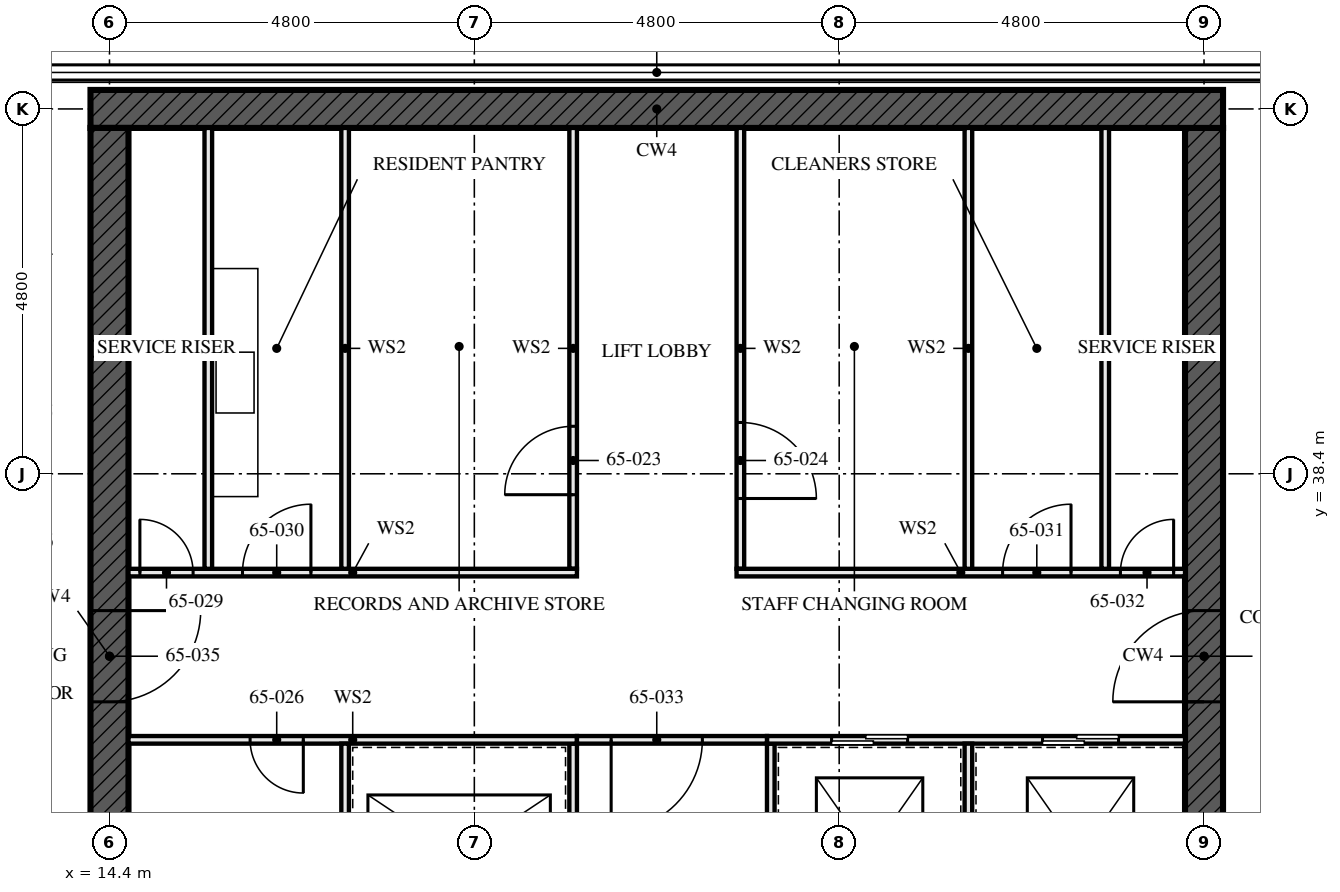
"""IFC4 building model, lengths in metres.
Left out: names, types, materials, properties, quantities, classifications, styles, units other than length and angle.
Written with IfcOpenShell. Run it as: python <this file> out.ifc"""

import sys

from ifc_helpers import new_model, si_unit, direction, frame, frame_2d, origin, place, context, subcontext, project, spatial, rectangle, extrude, element, fill, save


model = new_model("IFC4")
c1 = context("Model", 3, precision=1e-05, world=origin(), true_north=direction((0.0, 1.0)))
c2 = subcontext(c1, "Body", "Model", "MODEL_VIEW")
j1 = project(units=[si_unit("LENGTHUNIT", "METRE"), si_unit("PLANEANGLEUNIT", "RADIAN")], contexts=[c1])
p1 = place(None, origin())
s1 = spatial("IfcSite", under=j1, at=p1, CompositionType="ELEMENT")
p2 = place(p1, origin())
s2 = spatial("IfcBuilding", under=s1, at=p2, CompositionType="ELEMENT")
p3 = place(p2, frame((0.0, 0.0, 236.5)))
s3 = spatial("IfcBuildingStorey", under=s2, at=p3, CompositionType="ELEMENT", Elevation=236.5)
p4 = place(p3, frame((29.05, 43.2, -0.17), z_axis=(0.0, 0.0, 1.0), x_axis=(-1.0, 0.0, 0.0)))
e1 = element("IfcWall", 1, at=p4, inside=s3, PredefinedType="SHEAR", context=c2, shape_type="SweptSolid", body=[
    extrude(rectangle(XDim=14.9, YDim=0.5, at=frame_2d((7.45, 0.0))), origin(), (0.0, 0.0, 1.0), 3.5),
])
p5 = place(p3, frame((14.4, 42.95, -0.17), z_axis=(0.0, 0.0, 1.0), x_axis=(0.0, -1.0, 0.0)))
e2 = element("IfcWall", 2, at=p5, inside=s3, PredefinedType="SHEAR", context=c2, shape_type="SweptSolid", body=[
    extrude(rectangle(XDim=13.9, YDim=0.5, at=frame_2d((6.95, 0.0))), origin(), (0.0, 0.0, 1.0), 3.5),
])
p6 = place(p5, frame((6.35, 0.0, 0.17)))
e3 = element("IfcOpeningElement", 3, at=p6, cuts=e2, PredefinedType="OPENING", context=c2, shape_type="SweptSolid", body=[
    extrude(rectangle(XDim=1.2, YDim=2.1, at=frame_2d((0.6, 1.05))), frame((0.0, 0.26, 0.0), z_axis=(0.0, -1.0, 0.0), x_axis=(1.0, 0.0, 0.0)), (0.0, 0.0, 1.0), 0.521),
])
p7 = place(p3, frame((28.8, 29.05, -0.17), z_axis=(0.0, 0.0, 1.0), x_axis=(0.0, 1.0, 0.0)))
e4 = element("IfcWall", 4, at=p7, inside=s3, PredefinedType="SHEAR", context=c2, shape_type="SweptSolid", body=[
    extrude(rectangle(XDim=13.9, YDim=0.5, at=frame_2d((6.95, 0.0))), origin(), (0.0, 0.0, 1.0), 3.5),
])
p8 = place(p7, frame((6.35, 0.0, 0.17)))
e5 = element("IfcOpeningElement", 5, at=p8, cuts=e4, PredefinedType="OPENING", context=c2, shape_type="SweptSolid", body=[
    extrude(rectangle(XDim=1.2, YDim=2.1, at=frame_2d((0.6, 1.05))), frame((0.0, 0.26, 0.0), z_axis=(0.0, -1.0, 0.0), x_axis=(1.0, 0.0, 0.0)), (0.0, 0.0, 1.0), 0.521),
])
for number, where, z_axis, x_axis in (
    (6, (15.7, 37.15, 0.0), (0.0, 0.0, 1.0), (0.0, 1.0, 0.0)),
    (7, (27.5, 37.15, 0.0), (0.0, 0.0, 1.0), (0.0, 1.0, 0.0)),
):
    element("IfcWall", number, at=place(p3, frame(where, z_axis=z_axis, x_axis=x_axis)), inside=s3, PredefinedType="SOLIDWALL", context=c2, shape_type="SweptSolid", body=[
        extrude(rectangle(XDim=5.8, YDim=0.1, at=frame_2d((2.9, 0.0))), origin(), (0.0, 0.0, 1.0), 3.33),
    ])
p9 = place(p3, frame((20.5, 29.05, 0.0), z_axis=(0.0, 0.0, 1.0), x_axis=(0.0, 1.0, 0.0)))
e8 = element("IfcWall", 8, at=p9, inside=s3, PredefinedType="SOLIDWALL", context=c2, shape_type="SweptSolid", body=[
    extrude(rectangle(XDim=5.8, YDim=0.1, at=frame_2d((2.9, 0.0))), origin(), (0.0, 0.0, 1.0), 3.33),
])
p10 = place(p9, frame((0.8, 0.0, 0.0)))
e9 = element("IfcOpeningElement", 9, at=p10, cuts=e8, PredefinedType="OPENING", context=c2, shape_type="SweptSolid", body=[
    extrude(rectangle(XDim=1.1, YDim=2.3, at=frame_2d((0.55, 1.15))), frame((0.0, 0.061, 0.0), z_axis=(0.0, -1.0, 0.0), x_axis=(1.0, 0.0, 0.0)), (0.0, 0.0, 1.0), 0.121),
])
p11 = place(p9, frame((3.775, 0.0, 0.0)))
e10 = element("IfcOpeningElement", 10, at=p11, cuts=e8, PredefinedType="OPENING", context=c2, shape_type="SweptSolid", body=[
    extrude(rectangle(XDim=1.1, YDim=2.3, at=frame_2d((0.55, 1.15))), frame((0.0, 0.061, 0.0), z_axis=(0.0, -1.0, 0.0), x_axis=(1.0, 0.0, 0.0)), (0.0, 0.0, 1.0), 0.121),
])
p12 = place(p3, frame((20.5, 37.15, 0.0), z_axis=(0.0, 0.0, 1.0), x_axis=(0.0, 1.0, 0.0)))
e11 = element("IfcWall", 11, at=p12, inside=s3, PredefinedType="SOLIDWALL", context=c2, shape_type="SweptSolid", body=[
    extrude(rectangle(XDim=5.8, YDim=0.1, at=frame_2d((2.9, 0.0))), origin(), (0.0, 0.0, 1.0), 3.33),
])
p13 = place(p12, frame((0.975, 0.0, 0.0)))
e12 = element("IfcOpeningElement", 12, at=p13, cuts=e11, PredefinedType="OPENING", context=c2, shape_type="SweptSolid", body=[
    extrude(rectangle(XDim=0.9, YDim=2.1, at=frame_2d((0.45, 1.05))), frame((0.0, 0.061, 0.0), z_axis=(0.0, -1.0, 0.0), x_axis=(1.0, 0.0, 0.0)), (0.0, 0.0, 1.0), 0.121),
])
p14 = place(p3, frame((22.7, 37.15, 0.0), z_axis=(0.0, 0.0, 1.0), x_axis=(0.0, 1.0, 0.0)))
e13 = element("IfcWall", 13, at=p14, inside=s3, PredefinedType="SOLIDWALL", context=c2, shape_type="SweptSolid", body=[
    extrude(rectangle(XDim=5.8, YDim=0.1, at=frame_2d((2.9, 0.0))), origin(), (0.0, 0.0, 1.0), 3.33),
])
p15 = place(p14, frame((0.925, 0.0, 0.0)))
e14 = element("IfcOpeningElement", 14, at=p15, cuts=e13, PredefinedType="OPENING", context=c2, shape_type="SweptSolid", body=[
    extrude(rectangle(XDim=1.0, YDim=2.1, at=frame_2d((0.5, 1.05))), frame((0.0, 0.061, 0.0), z_axis=(0.0, -1.0, 0.0), x_axis=(1.0, 0.0, 0.0)), (0.0, 0.0, 1.0), 0.121),
])
p16 = place(p3, frame((23.1, 29.05, 0.0), z_axis=(0.0, 0.0, 1.0), x_axis=(0.0, 1.0, 0.0)))
e15 = element("IfcWall", 15, at=p16, inside=s3, PredefinedType="SOLIDWALL", context=c2, shape_type="SweptSolid", body=[
    extrude(rectangle(XDim=5.8, YDim=0.1, at=frame_2d((2.9, 0.0))), origin(), (0.0, 0.0, 1.0), 3.33),
])
p17 = place(p16, frame((1.0, 0.0, 0.0)))
e16 = element("IfcOpeningElement", 16, at=p17, cuts=e15, PredefinedType="OPENING", context=c2, shape_type="SweptSolid", body=[
    extrude(rectangle(XDim=0.7, YDim=2.1, at=frame_2d((0.35, 1.05))), frame((0.0, 0.061, 0.0), z_axis=(0.0, -1.0, 0.0), x_axis=(1.0, 0.0, 0.0)), (0.0, 0.0, 1.0), 0.121),
])
p18 = place(p3, frame((14.65, 34.9, 0.0), z_axis=(0.0, 0.0, 1.0), x_axis=(1.0, 0.0, 0.0)))
e17 = element("IfcWall", 17, at=p18, inside=s3, PredefinedType="SOLIDWALL", context=c2, shape_type="SweptSolid", body=[
    extrude(rectangle(XDim=5.9, YDim=0.1, at=frame_2d((2.95, 0.0))), origin(), (0.0, 0.0, 1.0), 3.33),
])
p19 = place(p18, frame((1.6, 0.0, 0.0)))
e18 = element("IfcOpeningElement", 18, at=p19, cuts=e17, PredefinedType="OPENING", context=c2, shape_type="SweptSolid", body=[
    extrude(rectangle(XDim=0.7, YDim=2.1, at=frame_2d((0.35, 1.05))), frame((0.0, 0.061, 0.0), z_axis=(0.0, -1.0, 0.0), x_axis=(1.0, 0.0, 0.0)), (0.0, 0.0, 1.0), 0.121),
])
p20 = place(p3, frame((23.05, 34.9, 0.0), z_axis=(0.0, 0.0, 1.0), x_axis=(1.0, 0.0, 0.0)))
e19 = element("IfcWall", 19, at=p20, inside=s3, PredefinedType="SOLIDWALL", context=c2, shape_type="SweptSolid", body=[
    extrude(rectangle(XDim=5.5, YDim=0.1, at=frame_2d((2.75, 0.0))), origin(), (0.0, 0.0, 1.0), 3.33),
])
p21 = place(p20, frame((0.85, 0.0, 0.0)))
e20 = element("IfcOpeningElement", 20, at=p21, cuts=e19, PredefinedType="OPENING", context=c2, shape_type="SweptSolid", body=[
    extrude(rectangle(XDim=1.0, YDim=2.1, at=frame_2d((0.5, 1.05))), frame((0.0, 0.061, 0.0), z_axis=(0.0, -1.0, 0.0), x_axis=(1.0, 0.0, 0.0)), (0.0, 0.0, 1.0), 0.121),
])
p22 = place(p20, frame((3.625, 0.0, 0.0)))
e21 = element("IfcOpeningElement", 21, at=p22, cuts=e19, PredefinedType="OPENING", context=c2, shape_type="SweptSolid", body=[
    extrude(rectangle(XDim=1.0, YDim=2.1, at=frame_2d((0.5, 1.05))), frame((0.0, 0.061, 0.0), z_axis=(0.0, -1.0, 0.0), x_axis=(1.0, 0.0, 0.0)), (0.0, 0.0, 1.0), 0.121),
])
p23 = place(p3, frame((14.65, 37.1, 0.0), z_axis=(0.0, 0.0, 1.0), x_axis=(1.0, 0.0, 0.0)))
e22 = element("IfcWall", 22, at=p23, inside=s3, PredefinedType="SOLIDWALL", context=c2, shape_type="SweptSolid", body=[
    extrude(rectangle(XDim=5.9, YDim=0.1, at=frame_2d((2.95, 0.0))), origin(), (0.0, 0.0, 1.0), 3.33),
])
p24 = place(p23, frame((0.15, 0.0, 0.0)))
e23 = element("IfcOpeningElement", 23, at=p24, cuts=e22, PredefinedType="OPENING", context=c2, shape_type="SweptSolid", body=[
    extrude(rectangle(XDim=0.7, YDim=2.1, at=frame_2d((0.35, 1.05))), frame((0.0, 0.061, 0.0), z_axis=(0.0, -1.0, 0.0), x_axis=(1.0, 0.0, 0.0)), (0.0, 0.0, 1.0), 0.121),
])
p25 = place(p23, frame((1.5, 0.0, 0.0)))
e24 = element("IfcOpeningElement", 24, at=p25, cuts=e22, PredefinedType="OPENING", context=c2, shape_type="SweptSolid", body=[
    extrude(rectangle(XDim=0.9, YDim=2.1, at=frame_2d((0.45, 1.05))), frame((0.0, 0.061, 0.0), z_axis=(0.0, -1.0, 0.0), x_axis=(1.0, 0.0, 0.0)), (0.0, 0.0, 1.0), 0.121),
])
p26 = place(p3, frame((22.65, 37.1, 0.0), z_axis=(0.0, 0.0, 1.0), x_axis=(1.0, 0.0, 0.0)))
e25 = element("IfcWall", 25, at=p26, inside=s3, PredefinedType="SOLIDWALL", context=c2, shape_type="SweptSolid", body=[
    extrude(rectangle(XDim=5.9, YDim=0.1, at=frame_2d((2.95, 0.0))), origin(), (0.0, 0.0, 1.0), 3.33),
])
p27 = place(p26, frame((3.5, 0.0, 0.0)))
e26 = element("IfcOpeningElement", 26, at=p27, cuts=e25, PredefinedType="OPENING", context=c2, shape_type="SweptSolid", body=[
    extrude(rectangle(XDim=0.9, YDim=2.1, at=frame_2d((0.45, 1.05))), frame((0.0, 0.061, 0.0), z_axis=(0.0, -1.0, 0.0), x_axis=(1.0, 0.0, 0.0)), (0.0, 0.0, 1.0), 0.121),
])
p28 = place(p26, frame((5.05, 0.0, 0.0)))
e27 = element("IfcOpeningElement", 27, at=p28, cuts=e25, PredefinedType="OPENING", context=c2, shape_type="SweptSolid", body=[
    extrude(rectangle(XDim=0.7, YDim=2.1, at=frame_2d((0.35, 1.05))), frame((0.0, 0.061, 0.0), z_axis=(0.0, -1.0, 0.0), x_axis=(1.0, 0.0, 0.0)), (0.0, 0.0, 1.0), 0.121),
])
p29 = place(p3, frame((20.55, 34.9, 0.0), z_axis=(0.0, 0.0, 1.0), x_axis=(1.0, 0.0, 0.0)))
e28 = element("IfcWall", 28, at=p29, inside=s3, PredefinedType="SOLIDWALL", context=c2, shape_type="SweptSolid", body=[
    extrude(rectangle(XDim=2.5, YDim=0.1, at=frame_2d((1.25, 0.0))), origin(), (0.0, 0.0, 1.0), 3.33),
])
p30 = place(p29, frame((0.45, 0.0, 0.0)))
e29 = element("IfcOpeningElement", 29, at=p30, cuts=e28, PredefinedType="OPENING", context=c2, shape_type="SweptSolid", body=[
    extrude(rectangle(XDim=1.2, YDim=2.1, at=frame_2d((0.6, 1.05))), frame((0.0, 0.061, 0.0), z_axis=(0.0, -1.0, 0.0), x_axis=(1.0, 0.0, 0.0)), (0.0, 0.0, 1.0), 0.121),
])
for number, where, z_axis, x_axis in (
    (30, (17.5, 29.05, 0.0), (0.0, 0.0, 1.0), (0.0, 1.0, 0.0)),
    (31, (17.5, 37.15, 0.0), (0.0, 0.0, 1.0), (0.0, 1.0, 0.0)),
    (32, (25.7, 37.15, 0.0), (0.0, 0.0, 1.0), (0.0, 1.0, 0.0)),
):
    element("IfcWall", number, at=place(p3, frame(where, z_axis=z_axis, x_axis=x_axis)), inside=s3, PredefinedType="SOLIDWALL", context=c2, shape_type="SweptSolid", body=[
        extrude(rectangle(XDim=5.8, YDim=0.1, at=frame_2d((2.9, 0.0))), origin(), (0.0, 0.0, 1.0), 3.33),
    ])
p31 = place(p3, frame((25.7, 31.95, 0.0), z_axis=(0.0, 0.0, 1.0), x_axis=(0.0, 1.0, 0.0)))
e33 = element("IfcWall", 33, at=p31, inside=s3, PredefinedType="SOLIDWALL", context=c2, shape_type="SweptSolid", body=[
    extrude(rectangle(XDim=2.9, YDim=0.1, at=frame_2d((1.45, 0.0))), origin(), (0.0, 0.0, 1.0), 3.33),
])
p32 = place(p13, origin())
e34 = element("IfcDoor", 34, at=p32, inside=s3, OperationType="SINGLE_SWING_RIGHT", PredefinedType="DOOR", context=c2, shape_type="SweptSolid", body=[
    extrude(rectangle(XDim=0.9, YDim=2.1, at=frame_2d((0.45, 1.05))), frame((0.0, 0.027, 0.0), z_axis=(0.0, -1.0, 0.0), x_axis=(1.0, 0.0, 0.0)), (0.0, 0.0, 1.0), 0.054),
])
fill(e12, e34)
p33 = place(p15, frame((1.0, 0.0, 0.0), z_axis=(0.0, 0.0, 1.0), x_axis=(-1.0, 0.0, 0.0)))
e35 = element("IfcDoor", 35, at=p33, inside=s3, OperationType="SINGLE_SWING_LEFT", PredefinedType="DOOR", context=c2, shape_type="SweptSolid", body=[
    extrude(rectangle(XDim=1.0, YDim=2.1, at=frame_2d((0.5, 1.05))), frame((0.0, 0.027, 0.0), z_axis=(0.0, -1.0, 0.0), x_axis=(1.0, 0.0, 0.0)), (0.0, 0.0, 1.0), 0.054),
])
fill(e14, e35)
p34 = place(p19, frame((0.7, 0.0, 0.0), z_axis=(0.0, 0.0, 1.0), x_axis=(-1.0, 0.0, 0.0)))
e36 = element("IfcDoor", 36, at=p34, inside=s3, OperationType="SINGLE_SWING_RIGHT", PredefinedType="DOOR", context=c2, shape_type="SweptSolid", body=[
    extrude(rectangle(XDim=0.7, YDim=2.1, at=frame_2d((0.35, 1.05))), frame((0.0, 0.027, 0.0), z_axis=(0.0, -1.0, 0.0), x_axis=(1.0, 0.0, 0.0)), (0.0, 0.0, 1.0), 0.054),
])
fill(e18, e36)
p35 = place(p21, origin())
e37 = element("IfcDoor", 37, at=p35, inside=s3, OperationType="SLIDING_TO_LEFT", PredefinedType="DOOR", context=c2, shape_type="SweptSolid", body=[
    extrude(rectangle(XDim=1.0, YDim=2.1, at=frame_2d((0.5, 1.05))), frame((0.0, 0.05, 0.0), z_axis=(0.0, -1.0, 0.0), x_axis=(1.0, 0.0, 0.0)), (0.0, 0.0, 1.0), 0.1),
])
fill(e20, e37)
p36 = place(p22, origin())
e38 = element("IfcDoor", 38, at=p36, inside=s3, OperationType="SLIDING_TO_LEFT", PredefinedType="DOOR", context=c2, shape_type="SweptSolid", body=[
    extrude(rectangle(XDim=1.0, YDim=2.1, at=frame_2d((0.5, 1.05))), frame((0.0, 0.05, 0.0), z_axis=(0.0, -1.0, 0.0), x_axis=(1.0, 0.0, 0.0)), (0.0, 0.0, 1.0), 0.1),
])
fill(e21, e38)
p37 = place(p24, origin())
e39 = element("IfcDoor", 39, at=p37, inside=s3, OperationType="SINGLE_SWING_RIGHT", PredefinedType="DOOR", context=c2, shape_type="SweptSolid", body=[
    extrude(rectangle(XDim=0.7, YDim=2.1, at=frame_2d((0.35, 1.05))), frame((0.0, 0.027, 0.0), z_axis=(0.0, -1.0, 0.0), x_axis=(1.0, 0.0, 0.0)), (0.0, 0.0, 1.0), 0.054),
])
fill(e23, e39)
p38 = place(p25, origin())
e40 = element("IfcDoor", 40, at=p38, inside=s3, OperationType="SINGLE_SWING_LEFT", PredefinedType="DOOR", context=c2, shape_type="SweptSolid", body=[
    extrude(rectangle(XDim=0.9, YDim=2.1, at=frame_2d((0.45, 1.05))), frame((0.0, 0.027, 0.0), z_axis=(0.0, -1.0, 0.0), x_axis=(1.0, 0.0, 0.0)), (0.0, 0.0, 1.0), 0.054),
])
fill(e24, e40)
p39 = place(p27, origin())
e41 = element("IfcDoor", 41, at=p39, inside=s3, OperationType="SINGLE_SWING_LEFT", PredefinedType="DOOR", context=c2, shape_type="SweptSolid", body=[
    extrude(rectangle(XDim=0.9, YDim=2.1, at=frame_2d((0.45, 1.05))), frame((0.0, 0.027, 0.0), z_axis=(0.0, -1.0, 0.0), x_axis=(1.0, 0.0, 0.0)), (0.0, 0.0, 1.0), 0.054),
])
fill(e26, e41)
p40 = place(p28, origin())
e42 = element("IfcDoor", 42, at=p40, inside=s3, OperationType="SINGLE_SWING_LEFT", PredefinedType="DOOR", context=c2, shape_type="SweptSolid", body=[
    extrude(rectangle(XDim=0.7, YDim=2.1, at=frame_2d((0.35, 1.05))), frame((0.0, 0.027, 0.0), z_axis=(0.0, -1.0, 0.0), x_axis=(1.0, 0.0, 0.0)), (0.0, 0.0, 1.0), 0.054),
])
fill(e27, e42)
p41 = place(p30, frame((1.2, 0.0, 0.0), z_axis=(0.0, 0.0, 1.0), x_axis=(-1.0, 0.0, 0.0)))
e43 = element("IfcDoor", 43, at=p41, inside=s3, OperationType="SINGLE_SWING_LEFT", PredefinedType="DOOR", context=c2, shape_type="SweptSolid", body=[
    extrude(rectangle(XDim=1.2, YDim=2.1, at=frame_2d((0.6, 1.05))), frame((0.0, 0.027, 0.0), z_axis=(0.0, -1.0, 0.0), x_axis=(1.0, 0.0, 0.0)), (0.0, 0.0, 1.0), 0.054),
])
fill(e29, e43)
p42 = place(p6, origin())
e44 = element("IfcDoor", 44, at=p42, inside=s3, OperationType="SINGLE_SWING_LEFT", PredefinedType="DOOR", context=c2, shape_type="SweptSolid", body=[
    extrude(rectangle(XDim=1.2, YDim=2.1, at=frame_2d((0.6, 1.05))), frame((0.0, 0.027, 0.0), z_axis=(0.0, -1.0, 0.0), x_axis=(1.0, 0.0, 0.0)), (0.0, 0.0, 1.0), 0.054),
])
fill(e3, e44)
p43 = place(p8, origin())
e45 = element("IfcDoor", 45, at=p43, inside=s3, OperationType="SINGLE_SWING_LEFT", PredefinedType="DOOR", context=c2, shape_type="SweptSolid", body=[
    extrude(rectangle(XDim=1.2, YDim=2.1, at=frame_2d((0.6, 1.05))), frame((0.0, 0.027, 0.0), z_axis=(0.0, -1.0, 0.0), x_axis=(1.0, 0.0, 0.0)), (0.0, 0.0, 1.0), 0.054),
])
fill(e5, e45)
save(model, sys.argv[1])
